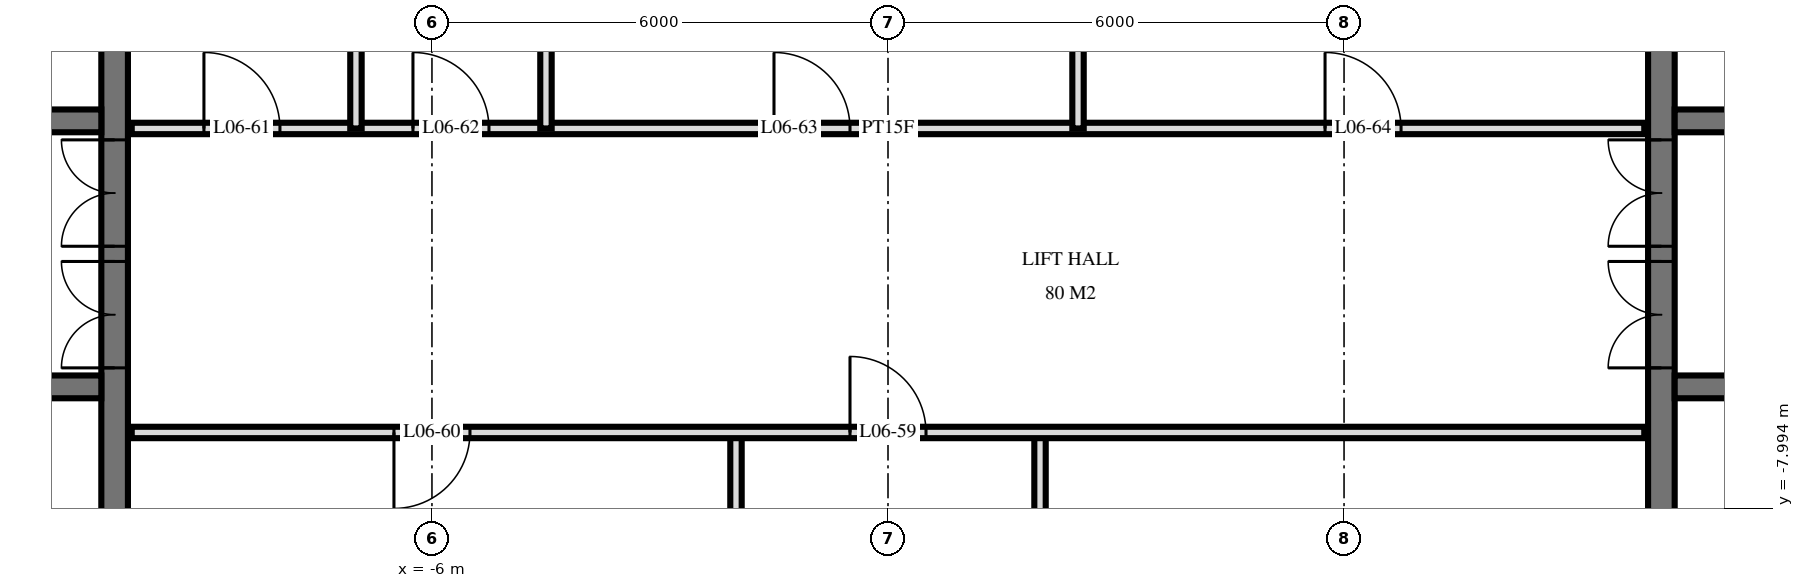
"""IFC4 building model, lengths in metres.
Left out: names, types, materials, properties, quantities, classifications, styles, units other than length and angle.
Written with IfcOpenShell. Run it as: python <this file> out.ifc"""

import sys

from ifc_helpers import new_model, si_unit, direction, frame, frame_2d, origin, place, context, subcontext, project, spatial, rectangle, extrude, element, fill, save


model = new_model("IFC4")
c1 = context("Model", 3, precision=1e-05, world=origin(), true_north=direction((0.0, 1.0)))
c2 = subcontext(c1, "Body", "Model", "MODEL_VIEW")
j1 = project(units=[si_unit("LENGTHUNIT", "METRE"), si_unit("PLANEANGLEUNIT", "RADIAN")], contexts=[c1])
p1 = place(None, origin())
s1 = spatial("IfcSite", under=j1, at=p1, CompositionType="ELEMENT")
p2 = place(p1, origin())
s2 = spatial("IfcBuilding", under=s1, at=p2, CompositionType="ELEMENT")
p3 = place(p2, frame((0.0, 0.0, 31.2)))
s3 = spatial("IfcBuildingStorey", under=s2, at=p3, CompositionType="ELEMENT", Elevation=31.2)
p4 = place(p3, frame((-10.175, -14.55, 0.0), z_axis=(0.0, 0.0, 1.0), x_axis=(0.0, 1.0, 0.0)))
e1 = element("IfcWall", 1, at=p4, inside=s3, PredefinedType="SHEAR", context=c2, shape_type="SweptSolid", body=[
    extrude(rectangle(XDim=14.1, YDim=0.35, at=frame_2d((7.05, 0.0))), origin(), (0.0, 0.0, 1.0), 3.6),
])
p5 = place(p4, frame((8.4, 0.0, 0.0)))
e2 = element("IfcOpeningElement", 2, at=p5, cuts=e1, PredefinedType="OPENING", context=c2, shape_type="SweptSolid", body=[
    extrude(rectangle(XDim=1.4, YDim=2.4, at=frame_2d((0.7, 1.2))), frame((0.0, 0.185, 0.0), z_axis=(0.0, -1.0, 0.0), x_axis=(1.0, 0.0, 0.0)), (0.0, 0.0, 1.0), 0.37),
])
p6 = place(p4, frame((10.0, 0.0, 0.0)))
e3 = element("IfcOpeningElement", 3, at=p6, cuts=e1, PredefinedType="OPENING", context=c2, shape_type="SweptSolid", body=[
    extrude(rectangle(XDim=1.4, YDim=2.4, at=frame_2d((0.7, 1.2))), frame((0.0, 0.185, 0.0), z_axis=(0.0, -1.0, 0.0), x_axis=(1.0, 0.0, 0.0)), (0.0, 0.0, 1.0), 0.37),
])
p7 = place(p4, frame((4.0, 0.0, 0.0)))
e4 = element("IfcOpeningElement", 4, at=p7, cuts=e1, PredefinedType="OPENING", context=c2, shape_type="SweptSolid", body=[
    extrude(rectangle(XDim=1.2, YDim=2.1, at=frame_2d((0.6, 1.05))), frame((0.0, 0.185, 0.0), z_axis=(0.0, -1.0, 0.0), x_axis=(1.0, 0.0, 0.0)), (0.0, 0.0, 1.0), 0.37),
])
p8 = place(p3, frame((-29.05, -2.9, 0.0), z_axis=(0.0, 0.0, 1.0), x_axis=(1.0, 0.0, 0.0)))
e5 = element("IfcWall", 5, at=p8, inside=s3, PredefinedType="SHEAR", context=c2, shape_type="SweptSolid", body=[
    extrude(rectangle(XDim=18.7, YDim=0.3, at=frame_2d((9.35, 0.0))), origin(), (0.0, 0.0, 1.0), 3.6),
])
p9 = place(p8, frame((2.95, 0.0, 0.0)))
e6 = element("IfcOpeningElement", 6, at=p9, cuts=e5, PredefinedType="OPENING", context=c2, shape_type="SweptSolid", body=[
    extrude(rectangle(XDim=1.1, YDim=2.1, at=frame_2d((0.55, 1.05))), frame((0.0, 0.16, 0.0), z_axis=(0.0, -1.0, 0.0), x_axis=(1.0, 0.0, 0.0)), (0.0, 0.0, 1.0), 0.32),
])
p10 = place(p8, frame((0.55, 0.0, 0.0)))
e7 = element("IfcOpeningElement", 7, at=p10, cuts=e5, PredefinedType="OPENING", context=c2, shape_type="SweptSolid", body=[
    extrude(rectangle(XDim=1.1, YDim=2.1, at=frame_2d((0.55, 1.05))), frame((0.0, 0.16, 0.0), z_axis=(0.0, -1.0, 0.0), x_axis=(1.0, 0.0, 0.0)), (0.0, 0.0, 1.0), 0.32),
])
p11 = place(p8, frame((11.863, 0.0, 0.0)))
e8 = element("IfcOpeningElement", 8, at=p11, cuts=e5, PredefinedType="OPENING", context=c2, shape_type="SweptSolid", body=[
    extrude(rectangle(XDim=0.9, YDim=2.1, at=frame_2d((0.45, 1.05))), frame((0.0, 0.16, 0.0), z_axis=(0.0, -1.0, 0.0), x_axis=(1.0, 0.0, 0.0)), (0.0, 0.0, 1.0), 0.32),
])
p12 = place(p8, frame((10.438, 0.0, 0.0)))
e9 = element("IfcOpeningElement", 9, at=p12, cuts=e5, PredefinedType="OPENING", context=c2, shape_type="SweptSolid", body=[
    extrude(rectangle(XDim=0.9, YDim=2.1, at=frame_2d((0.45, 1.05))), frame((0.0, 0.16, 0.0), z_axis=(0.0, -1.0, 0.0), x_axis=(1.0, 0.0, 0.0)), (0.0, 0.0, 1.0), 0.32),
])
p13 = place(p8, frame((16.85, 0.0, 0.0)))
e10 = element("IfcOpeningElement", 10, at=p13, cuts=e5, PredefinedType="OPENING", context=c2, shape_type="SweptSolid", body=[
    extrude(rectangle(XDim=1.0, YDim=2.1, at=frame_2d((0.5, 1.05))), frame((0.0, 0.16, 0.0), z_axis=(0.0, -1.0, 0.0), x_axis=(1.0, 0.0, 0.0)), (0.0, 0.0, 1.0), 0.32),
])
p14 = place(p8, frame((14.562, 0.0, 0.0)))
e11 = element("IfcOpeningElement", 11, at=p14, cuts=e5, PredefinedType="OPENING", context=c2, shape_type="SweptSolid", body=[
    extrude(rectangle(XDim=1.0, YDim=2.1, at=frame_2d((0.5, 1.05))), frame((0.0, 0.16, 0.0), z_axis=(0.0, -1.0, 0.0), x_axis=(1.0, 0.0, 0.0)), (0.0, 0.0, 1.0), 0.32),
])
p15 = place(p8, frame((13.137, 0.0, 0.0)))
e12 = element("IfcOpeningElement", 12, at=p15, cuts=e5, PredefinedType="OPENING", context=c2, shape_type="SweptSolid", body=[
    extrude(rectangle(XDim=1.0, YDim=2.1, at=frame_2d((0.5, 1.05))), frame((0.0, 0.16, 0.0), z_axis=(0.0, -1.0, 0.0), x_axis=(1.0, 0.0, 0.0)), (0.0, 0.0, 1.0), 0.32),
])
p16 = place(p8, frame((5.6, 0.0, 0.0)))
e13 = element("IfcOpeningElement", 13, at=p16, cuts=e5, PredefinedType="OPENING", context=c2, shape_type="SweptSolid", body=[
    extrude(rectangle(XDim=1.0, YDim=2.1, at=frame_2d((0.5, 1.05))), frame((0.0, 0.16, 0.0), z_axis=(0.0, -1.0, 0.0), x_axis=(1.0, 0.0, 0.0)), (0.0, 0.0, 1.0), 0.32),
])
p17 = place(p3, frame((-29.05, -6.4, 0.0), z_axis=(0.0, 0.0, 1.0), x_axis=(1.0, 0.0, 0.0)))
e14 = element("IfcWall", 14, at=p17, inside=s3, PredefinedType="SHEAR", context=c2, shape_type="SweptSolid", body=[
    extrude(rectangle(XDim=18.7, YDim=0.3, at=frame_2d((9.35, 0.0))), origin(), (0.0, 0.0, 1.0), 3.6),
])
p18 = place(p17, frame((2.95, 0.0, 0.0)))
e15 = element("IfcOpeningElement", 15, at=p18, cuts=e14, PredefinedType="OPENING", context=c2, shape_type="SweptSolid", body=[
    extrude(rectangle(XDim=1.1, YDim=2.1, at=frame_2d((0.55, 1.05))), frame((0.0, 0.16, 0.0), z_axis=(0.0, -1.0, 0.0), x_axis=(1.0, 0.0, 0.0)), (0.0, 0.0, 1.0), 0.32),
])
p19 = place(p17, frame((0.55, 0.0, 0.0)))
e16 = element("IfcOpeningElement", 16, at=p19, cuts=e14, PredefinedType="OPENING", context=c2, shape_type="SweptSolid", body=[
    extrude(rectangle(XDim=1.1, YDim=2.1, at=frame_2d((0.55, 1.05))), frame((0.0, 0.16, 0.0), z_axis=(0.0, -1.0, 0.0), x_axis=(1.0, 0.0, 0.0)), (0.0, 0.0, 1.0), 0.32),
])
p20 = place(p17, frame((10.8, 0.0, 0.0)))
e17 = element("IfcOpeningElement", 17, at=p20, cuts=e14, PredefinedType="OPENING", context=c2, shape_type="SweptSolid", body=[
    extrude(rectangle(XDim=1.1, YDim=2.1, at=frame_2d((0.55, 1.05))), frame((0.0, 0.16, 0.0), z_axis=(0.0, -1.0, 0.0), x_axis=(1.0, 0.0, 0.0)), (0.0, 0.0, 1.0), 0.32),
])
p21 = place(p17, frame((5.6, 0.0, 0.0)))
e18 = element("IfcOpeningElement", 18, at=p21, cuts=e14, PredefinedType="OPENING", context=c2, shape_type="SweptSolid", body=[
    extrude(rectangle(XDim=1.0, YDim=2.1, at=frame_2d((0.5, 1.05))), frame((0.0, 0.16, 0.0), z_axis=(0.0, -1.0, 0.0), x_axis=(1.0, 0.0, 0.0)), (0.0, 0.0, 1.0), 0.32),
])
p22 = place(p3, frame((10.175, -14.55, 0.0), z_axis=(0.0, 0.0, 1.0), x_axis=(0.0, 1.0, 0.0)))
e19 = element("IfcWall", 19, at=p22, inside=s3, PredefinedType="SHEAR", context=c2, shape_type="SweptSolid", body=[
    extrude(rectangle(XDim=14.1, YDim=0.35, at=frame_2d((7.05, 0.0))), origin(), (0.0, 0.0, 1.0), 3.6),
])
p23 = place(p22, frame((8.4, 0.0, 0.0)))
e20 = element("IfcOpeningElement", 20, at=p23, cuts=e19, PredefinedType="OPENING", context=c2, shape_type="SweptSolid", body=[
    extrude(rectangle(XDim=1.4, YDim=2.4, at=frame_2d((0.7, 1.2))), frame((0.0, 0.185, 0.0), z_axis=(0.0, -1.0, 0.0), x_axis=(1.0, 0.0, 0.0)), (0.0, 0.0, 1.0), 0.37),
])
p24 = place(p22, frame((10.0, 0.0, 0.0)))
e21 = element("IfcOpeningElement", 21, at=p24, cuts=e19, PredefinedType="OPENING", context=c2, shape_type="SweptSolid", body=[
    extrude(rectangle(XDim=1.4, YDim=2.4, at=frame_2d((0.7, 1.2))), frame((0.0, 0.185, 0.0), z_axis=(0.0, -1.0, 0.0), x_axis=(1.0, 0.0, 0.0)), (0.0, 0.0, 1.0), 0.37),
])
p25 = place(p22, frame((4.0, 0.0, 0.0)))
e22 = element("IfcOpeningElement", 22, at=p25, cuts=e19, PredefinedType="OPENING", context=c2, shape_type="SweptSolid", body=[
    extrude(rectangle(XDim=1.2, YDim=2.1, at=frame_2d((0.6, 1.05))), frame((0.0, 0.185, 0.0), z_axis=(0.0, -1.0, 0.0), x_axis=(1.0, 0.0, 0.0)), (0.0, 0.0, 1.0), 0.37),
])
p26 = place(p3, frame((10.35, -2.9, 0.0), z_axis=(0.0, 0.0, 1.0), x_axis=(1.0, 0.0, 0.0)))
e23 = element("IfcWall", 23, at=p26, inside=s3, PredefinedType="SHEAR", context=c2, shape_type="SweptSolid", body=[
    extrude(rectangle(XDim=18.7, YDim=0.3, at=frame_2d((9.35, 0.0))), origin(), (0.0, 0.0, 1.0), 3.6),
])
p27 = place(p26, frame((14.65, 0.0, 0.0)))
e24 = element("IfcOpeningElement", 24, at=p27, cuts=e23, PredefinedType="OPENING", context=c2, shape_type="SweptSolid", body=[
    extrude(rectangle(XDim=1.1, YDim=2.1, at=frame_2d((0.55, 1.05))), frame((0.0, 0.16, 0.0), z_axis=(0.0, -1.0, 0.0), x_axis=(1.0, 0.0, 0.0)), (0.0, 0.0, 1.0), 0.32),
])
p28 = place(p26, frame((17.05, 0.0, 0.0)))
e25 = element("IfcOpeningElement", 25, at=p28, cuts=e23, PredefinedType="OPENING", context=c2, shape_type="SweptSolid", body=[
    extrude(rectangle(XDim=1.1, YDim=2.1, at=frame_2d((0.55, 1.05))), frame((0.0, 0.16, 0.0), z_axis=(0.0, -1.0, 0.0), x_axis=(1.0, 0.0, 0.0)), (0.0, 0.0, 1.0), 0.32),
])
p29 = place(p26, frame((5.938, 0.0, 0.0)))
e26 = element("IfcOpeningElement", 26, at=p29, cuts=e23, PredefinedType="OPENING", context=c2, shape_type="SweptSolid", body=[
    extrude(rectangle(XDim=0.9, YDim=2.1, at=frame_2d((0.45, 1.05))), frame((0.0, 0.16, 0.0), z_axis=(0.0, -1.0, 0.0), x_axis=(1.0, 0.0, 0.0)), (0.0, 0.0, 1.0), 0.32),
])
p30 = place(p26, frame((7.363, 0.0, 0.0)))
e27 = element("IfcOpeningElement", 27, at=p30, cuts=e23, PredefinedType="OPENING", context=c2, shape_type="SweptSolid", body=[
    extrude(rectangle(XDim=0.9, YDim=2.1, at=frame_2d((0.45, 1.05))), frame((0.0, 0.16, 0.0), z_axis=(0.0, -1.0, 0.0), x_axis=(1.0, 0.0, 0.0)), (0.0, 0.0, 1.0), 0.32),
])
p31 = place(p26, frame((0.85, 0.0, 0.0)))
e28 = element("IfcOpeningElement", 28, at=p31, cuts=e23, PredefinedType="OPENING", context=c2, shape_type="SweptSolid", body=[
    extrude(rectangle(XDim=1.0, YDim=2.1, at=frame_2d((0.5, 1.05))), frame((0.0, 0.16, 0.0), z_axis=(0.0, -1.0, 0.0), x_axis=(1.0, 0.0, 0.0)), (0.0, 0.0, 1.0), 0.32),
])
p32 = place(p26, frame((3.137, 0.0, 0.0)))
e29 = element("IfcOpeningElement", 29, at=p32, cuts=e23, PredefinedType="OPENING", context=c2, shape_type="SweptSolid", body=[
    extrude(rectangle(XDim=1.0, YDim=2.1, at=frame_2d((0.5, 1.05))), frame((0.0, 0.16, 0.0), z_axis=(0.0, -1.0, 0.0), x_axis=(1.0, 0.0, 0.0)), (0.0, 0.0, 1.0), 0.32),
])
p33 = place(p26, frame((4.562, 0.0, 0.0)))
e30 = element("IfcOpeningElement", 30, at=p33, cuts=e23, PredefinedType="OPENING", context=c2, shape_type="SweptSolid", body=[
    extrude(rectangle(XDim=1.0, YDim=2.1, at=frame_2d((0.5, 1.05))), frame((0.0, 0.16, 0.0), z_axis=(0.0, -1.0, 0.0), x_axis=(1.0, 0.0, 0.0)), (0.0, 0.0, 1.0), 0.32),
])
p34 = place(p26, frame((12.1, 0.0, 0.0)))
e31 = element("IfcOpeningElement", 31, at=p34, cuts=e23, PredefinedType="OPENING", context=c2, shape_type="SweptSolid", body=[
    extrude(rectangle(XDim=1.0, YDim=2.1, at=frame_2d((0.5, 1.05))), frame((0.0, 0.16, 0.0), z_axis=(0.0, -1.0, 0.0), x_axis=(1.0, 0.0, 0.0)), (0.0, 0.0, 1.0), 0.32),
])
p35 = place(p3, frame((10.35, -6.4, 0.0), z_axis=(0.0, 0.0, 1.0), x_axis=(1.0, 0.0, 0.0)))
e32 = element("IfcWall", 32, at=p35, inside=s3, PredefinedType="SHEAR", context=c2, shape_type="SweptSolid", body=[
    extrude(rectangle(XDim=18.7, YDim=0.3, at=frame_2d((9.35, 0.0))), origin(), (0.0, 0.0, 1.0), 3.6),
])
p36 = place(p35, frame((14.65, 0.0, 0.0)))
e33 = element("IfcOpeningElement", 33, at=p36, cuts=e32, PredefinedType="OPENING", context=c2, shape_type="SweptSolid", body=[
    extrude(rectangle(XDim=1.1, YDim=2.1, at=frame_2d((0.55, 1.05))), frame((0.0, 0.16, 0.0), z_axis=(0.0, -1.0, 0.0), x_axis=(1.0, 0.0, 0.0)), (0.0, 0.0, 1.0), 0.32),
])
p37 = place(p35, frame((17.05, 0.0, 0.0)))
e34 = element("IfcOpeningElement", 34, at=p37, cuts=e32, PredefinedType="OPENING", context=c2, shape_type="SweptSolid", body=[
    extrude(rectangle(XDim=1.1, YDim=2.1, at=frame_2d((0.55, 1.05))), frame((0.0, 0.16, 0.0), z_axis=(0.0, -1.0, 0.0), x_axis=(1.0, 0.0, 0.0)), (0.0, 0.0, 1.0), 0.32),
])
p38 = place(p35, frame((6.8, 0.0, 0.0)))
e35 = element("IfcOpeningElement", 35, at=p38, cuts=e32, PredefinedType="OPENING", context=c2, shape_type="SweptSolid", body=[
    extrude(rectangle(XDim=1.1, YDim=2.1, at=frame_2d((0.55, 1.05))), frame((0.0, 0.16, 0.0), z_axis=(0.0, -1.0, 0.0), x_axis=(1.0, 0.0, 0.0)), (0.0, 0.0, 1.0), 0.32),
])
p39 = place(p35, frame((12.1, 0.0, 0.0)))
e36 = element("IfcOpeningElement", 36, at=p39, cuts=e32, PredefinedType="OPENING", context=c2, shape_type="SweptSolid", body=[
    extrude(rectangle(XDim=1.0, YDim=2.1, at=frame_2d((0.5, 1.05))), frame((0.0, 0.16, 0.0), z_axis=(0.0, -1.0, 0.0), x_axis=(1.0, 0.0, 0.0)), (0.0, 0.0, 1.0), 0.32),
])
p40 = place(p3, frame((2.5, -3.0, 0.0), z_axis=(0.0, 0.0, 1.0), x_axis=(0.0, 1.0, 0.0)))
e37 = element("IfcWall", 37, at=p40, inside=s3, PredefinedType="PARTITIONING", context=c2, shape_type="SweptSolid", body=[
    extrude(rectangle(XDim=4.02, YDim=0.15, at=frame_2d((2.01, 0.0))), origin(), (0.0, 0.0, 1.0), 3.32),
])
for number, where, z_axis, x_axis in (
    (38, (2.0, -11.0, 0.0), (0.0, 0.0, 1.0), (0.0, 1.0, 0.0)),
    (39, (-2.0, -11.0, 0.0), (0.0, 0.0, 1.0), (0.0, 1.0, 0.0)),
):
    element("IfcWall", number, at=place(p3, frame(where, z_axis=z_axis, x_axis=x_axis)), inside=s3, PredefinedType="PARTITIONING", context=c2, shape_type="SweptSolid", body=[
        extrude(rectangle(XDim=4.0, YDim=0.15, at=frame_2d((2.0, 0.0))), origin(), (0.0, 0.0, 1.0), 3.32),
    ])
for number, where, z_axis, x_axis in (
    (40, (-4.5, -3.0, 0.0), (0.0, 0.0, 1.0), (0.0, 1.0, 0.0)),
    (41, (-7.0, -3.0, 0.0), (0.0, 0.0, 1.0), (0.0, 1.0, 0.0)),
):
    element("IfcWall", number, at=place(p3, frame(where, z_axis=z_axis, x_axis=x_axis)), inside=s3, PredefinedType="PLUMBINGWALL", context=c2, shape_type="SweptSolid", body=[
        extrude(rectangle(XDim=4.02, YDim=0.15, at=frame_2d((2.01, 0.0))), origin(), (0.0, 0.0, 1.0), 3.32),
    ])
p41 = place(p3, frame((-9.95, -7.0, 0.0), z_axis=(0.0, 0.0, 1.0), x_axis=(1.0, 0.0, 0.0)))
e42 = element("IfcWall", 42, at=p41, inside=s3, PredefinedType="PARTITIONING", context=c2, shape_type="SweptSolid", body=[
    extrude(rectangle(XDim=19.9, YDim=0.15, at=frame_2d((9.95, 0.0))), origin(), (0.0, 0.0, 1.0), 3.32),
])
p42 = place(p41, frame((9.45, 0.0, 0.0)))
e43 = element("IfcOpeningElement", 43, at=p42, cuts=e42, PredefinedType="OPENING", context=c2, shape_type="SweptSolid", body=[
    extrude(rectangle(XDim=1.0, YDim=2.1, at=frame_2d((0.5, 1.05))), frame((0.0, 0.085, 0.0), z_axis=(0.0, -1.0, 0.0), x_axis=(1.0, 0.0, 0.0)), (0.0, 0.0, 1.0), 0.17),
])
p43 = place(p41, frame((3.45, 0.0, 0.0)))
e44 = element("IfcOpeningElement", 44, at=p43, cuts=e42, PredefinedType="OPENING", context=c2, shape_type="SweptSolid", body=[
    extrude(rectangle(XDim=1.0, YDim=2.1, at=frame_2d((0.5, 1.05))), frame((0.0, 0.085, 0.0), z_axis=(0.0, -1.0, 0.0), x_axis=(1.0, 0.0, 0.0)), (0.0, 0.0, 1.0), 0.17),
])
p44 = place(p3, frame((-9.95, -3.0, 0.0), z_axis=(0.0, 0.0, 1.0), x_axis=(1.0, 0.0, 0.0)))
e45 = element("IfcWall", 45, at=p44, inside=s3, PredefinedType="PARTITIONING", context=c2, shape_type="SweptSolid", body=[
    extrude(rectangle(XDim=19.9, YDim=0.15, at=frame_2d((9.95, 0.0))), origin(), (0.0, 0.0, 1.0), 3.32),
])
p45 = place(p44, frame((0.95, 0.0, 0.0)))
e46 = element("IfcOpeningElement", 46, at=p45, cuts=e45, PredefinedType="OPENING", context=c2, shape_type="SweptSolid", body=[
    extrude(rectangle(XDim=1.0, YDim=2.1, at=frame_2d((0.5, 1.05))), frame((0.0, 0.085, 0.0), z_axis=(0.0, -1.0, 0.0), x_axis=(1.0, 0.0, 0.0)), (0.0, 0.0, 1.0), 0.17),
])
p46 = place(p44, frame((3.7, 0.0, 0.0)))
e47 = element("IfcOpeningElement", 47, at=p46, cuts=e45, PredefinedType="OPENING", context=c2, shape_type="SweptSolid", body=[
    extrude(rectangle(XDim=1.0, YDim=2.1, at=frame_2d((0.5, 1.05))), frame((0.0, 0.085, 0.0), z_axis=(0.0, -1.0, 0.0), x_axis=(1.0, 0.0, 0.0)), (0.0, 0.0, 1.0), 0.17),
])
p47 = place(p44, frame((8.45, 0.0, 0.0)))
e48 = element("IfcOpeningElement", 48, at=p47, cuts=e45, PredefinedType="OPENING", context=c2, shape_type="SweptSolid", body=[
    extrude(rectangle(XDim=1.0, YDim=2.1, at=frame_2d((0.5, 1.05))), frame((0.0, 0.085, 0.0), z_axis=(0.0, -1.0, 0.0), x_axis=(1.0, 0.0, 0.0)), (0.0, 0.0, 1.0), 0.17),
])
p48 = place(p44, frame((15.7, 0.0, 0.0)))
e49 = element("IfcOpeningElement", 49, at=p48, cuts=e45, PredefinedType="OPENING", context=c2, shape_type="SweptSolid", body=[
    extrude(rectangle(XDim=1.0, YDim=2.1, at=frame_2d((0.5, 1.05))), frame((0.0, 0.085, 0.0), z_axis=(0.0, -1.0, 0.0), x_axis=(1.0, 0.0, 0.0)), (0.0, 0.0, 1.0), 0.17),
])
p49 = place(p5, origin())
e50 = element("IfcDoor", 50, at=p49, inside=s3, OperationType="DOUBLE_DOOR_SINGLE_SWING", PredefinedType="DOOR", context=c2, shape_type="SweptSolid", body=[
    extrude(rectangle(XDim=1.4, YDim=2.4, at=frame_2d((0.7, 1.2))), frame((0.0, 0.025, 0.0), z_axis=(0.0, -1.0, 0.0), x_axis=(1.0, 0.0, 0.0)), (0.0, 0.0, 1.0), 0.05),
])
fill(e2, e50)
p50 = place(p6, origin())
e51 = element("IfcDoor", 51, at=p50, inside=s3, OperationType="DOUBLE_DOOR_SINGLE_SWING", PredefinedType="DOOR", context=c2, shape_type="SweptSolid", body=[
    extrude(rectangle(XDim=1.4, YDim=2.4, at=frame_2d((0.7, 1.2))), frame((0.0, 0.025, 0.0), z_axis=(0.0, -1.0, 0.0), x_axis=(1.0, 0.0, 0.0)), (0.0, 0.0, 1.0), 0.05),
])
fill(e3, e51)
p51 = place(p23, origin())
e52 = element("IfcDoor", 52, at=p51, inside=s3, OperationType="DOUBLE_DOOR_SINGLE_SWING", PredefinedType="DOOR", context=c2, shape_type="SweptSolid", body=[
    extrude(rectangle(XDim=1.4, YDim=2.4, at=frame_2d((0.7, 1.2))), frame((0.0, 0.025, 0.0), z_axis=(0.0, -1.0, 0.0), x_axis=(1.0, 0.0, 0.0)), (0.0, 0.0, 1.0), 0.05),
])
fill(e20, e52)
p52 = place(p24, origin())
e53 = element("IfcDoor", 53, at=p52, inside=s3, OperationType="DOUBLE_DOOR_SINGLE_SWING", PredefinedType="DOOR", context=c2, shape_type="SweptSolid", body=[
    extrude(rectangle(XDim=1.4, YDim=2.4, at=frame_2d((0.7, 1.2))), frame((0.0, 0.025, 0.0), z_axis=(0.0, -1.0, 0.0), x_axis=(1.0, 0.0, 0.0)), (0.0, 0.0, 1.0), 0.05),
])
fill(e21, e53)
p53 = place(p42, origin())
e54 = element("IfcDoor", 54, at=p53, inside=s3, OperationType="SINGLE_SWING_RIGHT", PredefinedType="DOOR", context=c2, shape_type="SweptSolid", body=[
    extrude(rectangle(XDim=1.0, YDim=2.1, at=frame_2d((0.5, 1.05))), frame((0.0, 0.025, 0.0), z_axis=(0.0, -1.0, 0.0), x_axis=(1.0, 0.0, 0.0)), (0.0, 0.0, 1.0), 0.05),
])
fill(e43, e54)
p54 = place(p43, frame((0.5, 0.0, 0.0), z_axis=(0.0, 0.0, 1.0), x_axis=(-1.0, 0.0, 0.0)))
e55 = element("IfcDoor", 55, at=p54, inside=s3, OperationType="SINGLE_SWING_LEFT", PredefinedType="DOOR", context=c2, shape_type="SweptSolid", body=[
    extrude(rectangle(XDim=1.0, YDim=2.1, at=frame_2d((0.0, 1.05))), frame((0.0, -0.025, 0.0), z_axis=(0.0, 1.0, 0.0), x_axis=(-1.0, 0.0, 0.0)), (0.0, 0.0, 1.0), 0.05),
])
fill(e44, e55)
p55 = place(p45, origin())
e56 = element("IfcDoor", 56, at=p55, inside=s3, OperationType="SINGLE_SWING_RIGHT", PredefinedType="DOOR", context=c2, shape_type="SweptSolid", body=[
    extrude(rectangle(XDim=1.0, YDim=2.1, at=frame_2d((0.5, 1.05))), frame((0.0, 0.025, 0.0), z_axis=(0.0, -1.0, 0.0), x_axis=(1.0, 0.0, 0.0)), (0.0, 0.0, 1.0), 0.05),
])
fill(e46, e56)
p56 = place(p46, origin())
e57 = element("IfcDoor", 57, at=p56, inside=s3, OperationType="SINGLE_SWING_RIGHT", PredefinedType="DOOR", context=c2, shape_type="SweptSolid", body=[
    extrude(rectangle(XDim=1.0, YDim=2.1, at=frame_2d((0.5, 1.05))), frame((0.0, 0.025, 0.0), z_axis=(0.0, -1.0, 0.0), x_axis=(1.0, 0.0, 0.0)), (0.0, 0.0, 1.0), 0.05),
])
fill(e47, e57)
p57 = place(p47, origin())
e58 = element("IfcDoor", 58, at=p57, inside=s3, OperationType="SINGLE_SWING_RIGHT", PredefinedType="DOOR", context=c2, shape_type="SweptSolid", body=[
    extrude(rectangle(XDim=1.0, YDim=2.1, at=frame_2d((0.5, 1.05))), frame((0.0, 0.025, 0.0), z_axis=(0.0, -1.0, 0.0), x_axis=(1.0, 0.0, 0.0)), (0.0, 0.0, 1.0), 0.05),
])
fill(e48, e58)
p58 = place(p48, origin())
e59 = element("IfcDoor", 59, at=p58, inside=s3, OperationType="SINGLE_SWING_RIGHT", PredefinedType="DOOR", context=c2, shape_type="SweptSolid", body=[
    extrude(rectangle(XDim=1.0, YDim=2.1, at=frame_2d((0.5, 1.05))), frame((0.0, 0.025, 0.0), z_axis=(0.0, -1.0, 0.0), x_axis=(1.0, 0.0, 0.0)), (0.0, 0.0, 1.0), 0.05),
])
fill(e49, e59)
save(model, sys.argv[1])
